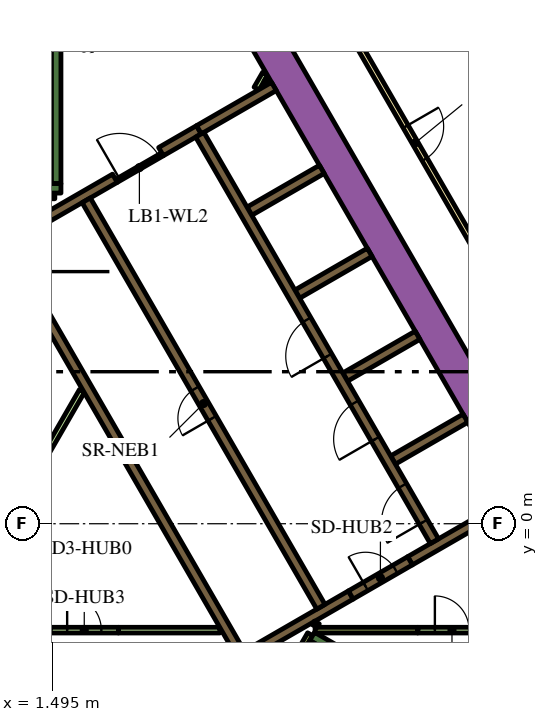
"""IFC4 building model, lengths in metres.
Left out: names, types, materials, properties, quantities, classifications, styles, units other than length and angle.
Written with IfcOpenShell. Run it as: python <this file> out.ifc"""

import sys

from ifc_helpers import new_model, si_unit, direction, frame, frame_2d, origin, place, context, subcontext, project, spatial, polyline, rectangle, outline, extrude, element, fill, save


model = new_model("IFC4")
c1 = context("Model", 3, precision=1e-05, world=origin(), true_north=direction((0.0, 1.0)))
c2 = subcontext(c1, "Body", "Model", "MODEL_VIEW")
j1 = project(units=[si_unit("LENGTHUNIT", "METRE"), si_unit("PLANEANGLEUNIT", "RADIAN")], contexts=[c1])
p1 = place(None, origin())
s1 = spatial("IfcSite", under=j1, at=p1, CompositionType="ELEMENT")
p2 = place(p1, origin())
s2 = spatial("IfcBuilding", under=s1, at=p2, CompositionType="ELEMENT")
p3 = place(p2, frame((0.0, 0.0, 130.5)))
s3 = spatial("IfcBuildingStorey", under=s2, at=p3, CompositionType="ELEMENT", Elevation=130.5)
p4 = place(p3, frame((6.776, 13.364, 0.0), z_axis=(0.0, 0.0, 1.0), x_axis=(0.500004177138, -0.8660229921, 0.0)))
e1 = element("IfcWall", 1, at=p4, inside=s3, PredefinedType="SOLIDWALL", context=c2, shape_type="SweptSolid", body=[
    extrude(rectangle(XDim=20.204, YDim=0.9, at=frame_2d((10.102, 0.0))), origin(), (0.0, 0.0, 1.0), 3.9),
])
p5 = place(p3, frame((8.334, -2.964, 0.0), z_axis=(0.0, 0.0, 1.0), x_axis=(0.866016039709, -0.500016218704, 0.0)))
e2 = element("IfcWall", 2, at=p5, inside=s3, PredefinedType="SOLIDWALL", context=c2, shape_type="SweptSolid", body=[
    extrude(rectangle(XDim=7.05, YDim=0.25, at=frame_2d((3.525, 0.0))), origin(), (0.0, 0.0, 1.0), 3.9),
])
p6 = place(p3, frame((8.163, -3.511, 0.0), z_axis=(0.0, 0.0, 1.0), x_axis=(0.500127794843, 0.865951608824, 0.0)))
e3 = element("IfcWall", 3, at=p6, inside=s3, PredefinedType="SOLIDWALL", context=c2, shape_type="SweptSolid", body=[
    extrude(rectangle(XDim=0.435, YDim=0.25, at=frame_2d((0.217, 0.0))), origin(), (0.0, 0.0, 1.0), 3.9),
])
p7 = place(p3, frame((1.6, 8.95, 0.0), z_axis=(0.0, 0.0, 1.0), x_axis=(0.0, 1.0, 0.0)))
e4 = element("IfcWall", 4, at=p7, inside=s3, PredefinedType="SOLIDWALL", context=c2, shape_type="SweptSolid", body=[
    extrude(rectangle(XDim=6.8, YDim=0.25, at=frame_2d((3.4, 0.0))), origin(), (0.0, 0.0, 1.0), 3.9),
])
p8 = place(p3, frame((1.05, 8.825, 0.0), z_axis=(0.0, 0.0, 1.0), x_axis=(1.0, 0.0, 0.0)))
e5 = element("IfcWall", 5, at=p8, inside=s3, PredefinedType="SOLIDWALL", context=c2, shape_type="SweptSolid", body=[
    extrude(rectangle(XDim=0.675, YDim=0.25, at=frame_2d((0.337, 0.0))), origin(), (0.0, 0.0, 1.0), 3.9),
])
p9 = place(p3, origin())
e6 = element("IfcWall", 6, at=p9, inside=s3, PredefinedType="SOLIDWALL", context=c2, shape_type="SweptSolid", body=[
    extrude(outline(polyline([(0.335, 6.925), (0.335, 7.075), (0.335, 7.075), (0.335, 7.075), (0.245, 7.075), (0.035, 7.439), (0.252, 7.564), (0.377, 7.348), (1.512, 5.382), (1.637, 5.165), (2.221, 4.153), (2.771, 3.199), (2.896, 2.983), (3.138, 2.564), (4.031, 1.017), (4.156, 0.801), (5.292, -1.165), (5.417, -1.382), (6.073, -2.519), (6.552, -3.348), (6.677, -3.564), (6.46, -3.689), (0.332, 6.925), (0.335, 6.925), (0.335, 6.925), (0.335, 6.925)])), origin(), (0.0, 0.0, 1.0), 3.9),
])
p10 = place(p3, frame((4.358, 9.791, 0.0), z_axis=(0.0, 0.0, 1.0), x_axis=(0.866079547155, 0.499906209203, 0.0)))
e7 = element("IfcWall", 7, at=p10, inside=s3, PredefinedType="SOLIDWALL", context=c2, shape_type="SweptSolid", body=[
    extrude(rectangle(XDim=1.15, YDim=0.25, at=frame_2d((0.575, 0.0))), origin(), (0.0, 0.0, 1.0), 3.9),
])
p11 = place(p3, frame((5.356, 10.367, 0.0), z_axis=(0.0, 0.0, 1.0), x_axis=(0.865978535641, 0.50008116922, 0.0)))
e8 = element("IfcWall", 8, at=p11, inside=s3, PredefinedType="SOLIDWALL", context=c2, shape_type="SweptSolid", body=[
    extrude(rectangle(XDim=2.278, YDim=0.25, at=frame_2d((1.139, 0.0))), origin(), (0.0, 0.0, 1.0), 3.9),
])
p12 = place(p3, frame((0.314, 7.456, 0.0), z_axis=(0.0, 0.0, 1.0), x_axis=(0.866013897511, 0.50001992892, 0.0)))
e9 = element("IfcWall", 9, at=p12, inside=s3, PredefinedType="SOLIDWALL", context=c2, shape_type="SweptSolid", body=[
    extrude(rectangle(XDim=3.268, YDim=0.25, at=frame_2d((1.634, 0.0))), origin(), (0.0, 0.0, 1.0), 3.9),
])
p13 = place(p3, frame((9.352, -1.875, 0.0), z_axis=(0.0, 0.0, 1.0), x_axis=(-0.866024844342, -0.500000968981, 0.0)))
e10 = element("IfcWall", 10, at=p13, inside=s3, PredefinedType="SOLIDWALL", context=c2, shape_type="SweptSolid", body=[
    extrude(rectangle(XDim=3.162, YDim=0.25, at=frame_2d((1.581, 0.0))), origin(), (0.0, 0.0, 1.0), 3.9),
])
for number, where, z_axis, x_axis in (
    (11, (6.684, 8.224, 0.0), (0.0, 0.0, 1.0), (0.866, 0.5, 0.0)),
    (12, (7.944, 6.041, 0.0), (0.0, 0.0, 1.0), (0.866, 0.5, 0.0)),
    (13, (9.204, 3.859, 0.0), (0.0, 0.0, 1.0), (0.866, 0.5, 0.0)),
):
    element("IfcWall", number, at=place(p3, frame(where, z_axis=z_axis, x_axis=x_axis)), inside=s3, PredefinedType="SOLIDWALL", context=c2, shape_type="SweptSolid", body=[
        extrude(rectangle(XDim=2.2, YDim=0.25, at=frame_2d((1.1, 0.0))), origin(), (0.0, 0.0, 1.0), 3.9),
    ])
p14 = place(p3, frame((10.911, -0.975, 0.0), z_axis=(0.0, 0.0, 1.0), x_axis=(0.866046979468, 0.499962627957, 0.0)))
e14 = element("IfcWall", 14, at=p14, inside=s3, PredefinedType="SOLIDWALL", context=c2, shape_type="SweptSolid", body=[
    extrude(rectangle(XDim=3.138, YDim=0.25, at=frame_2d((1.569, 0.0))), origin(), (0.0, 0.0, 1.0), 3.9),
])
p15 = place(p3, frame((10.464, 1.677, 0.0), z_axis=(0.0, 0.0, 1.0), x_axis=(0.86605622881, 0.499946605688, 0.0)))
e15 = element("IfcWall", 15, at=p15, inside=s3, PredefinedType="SOLIDWALL", context=c2, shape_type="SweptSolid", body=[
    extrude(rectangle(XDim=2.2, YDim=0.25, at=frame_2d((1.1, 0.0))), origin(), (0.0, 0.0, 1.0), 3.9),
])
p16 = place(p3, frame((8.412, -2.8, 0.0), z_axis=(0.0, 0.0, 1.0), x_axis=(1.0, 0.0, 0.0)))
e16 = element("IfcWall", 16, at=p16, inside=s3, PredefinedType="PARTITIONING", context=c2, shape_type="SweptSolid", body=[
    extrude(rectangle(XDim=2.702, YDim=0.15, at=frame_2d((1.351, 0.0))), origin(), (0.0, 0.0, 1.0), 3.9),
])
p17 = place(p3, frame((8.459, -2.599, 0.0), z_axis=(0.0, 0.0, 1.0), x_axis=(-0.501919277433, -0.864914469148, 0.0)))
e17 = element("IfcWall", 17, at=p17, inside=s3, PredefinedType="PARTITIONING", context=c2, shape_type="SweptSolid", body=[
    extrude(rectangle(XDim=0.109, YDim=0.15, at=frame_2d((0.054, 0.0))), origin(), (0.0, 0.0, 1.0), 3.9),
])
p18 = place(p3, frame((8.281, -2.907, 0.0), z_axis=(0.0, 0.0, 1.0), x_axis=(-0.500193841991, -0.86591346013, 0.0)))
e18 = element("IfcWall", 18, at=p18, inside=s3, PredefinedType="PARTITIONING", context=c2, shape_type="SweptSolid", body=[
    extrude(rectangle(XDim=0.583, YDim=0.15, at=frame_2d((0.292, 0.0))), origin(), (0.0, 0.0, 1.0), 3.9),
])
p19 = place(p3, frame((3.238, -2.8, 0.0), z_axis=(0.0, 0.0, 1.0), x_axis=(1.0, 0.0, 0.0)))
e19 = element("IfcWall", 19, at=p19, inside=s3, PredefinedType="PARTITIONING", context=c2, shape_type="SweptSolid", body=[
    extrude(rectangle(XDim=2.672, YDim=0.15, at=frame_2d((1.336, 0.0))), origin(), (0.0, 0.0, 1.0), 2.6),
])
p20 = place(p3, frame((1.016, 1.309, 0.0), z_axis=(0.0, 0.0, 1.0), x_axis=(0.49998231768, 0.866035612436, 0.0)))
e20 = element("IfcWall", 20, at=p20, inside=s3, PredefinedType="PARTITIONING", context=c2, shape_type="SweptSolid", body=[
    extrude(rectangle(XDim=2.521, YDim=0.15, at=frame_2d((1.26, 0.0))), origin(), (0.0, 0.0, 1.0), 2.6),
])
p21 = place(p3, frame((1.05, 8.625, 0.0), z_axis=(0.0, 0.0, 1.0), x_axis=(1.0, 0.0, 0.0)))
e21 = element("IfcWall", 21, at=p21, inside=s3, PredefinedType="PARTITIONING", context=c2, shape_type="SweptSolid", body=[
    extrude(rectangle(XDim=0.514, YDim=0.15, at=frame_2d((0.257, 0.0))), origin(), (0.0, 0.0, 1.0), 2.6),
])
p22 = place(p3, frame((6.872, 11.45, 0.0), z_axis=(0.0, 0.0, 1.0), x_axis=(0.499846793097, 0.866113839764, 0.0)))
e22 = element("IfcWall", 22, at=p22, inside=s3, PredefinedType="PARTITIONING", context=c2, shape_type="SweptSolid", body=[
    extrude(rectangle(XDim=0.453, YDim=0.15, at=frame_2d((0.227, 0.0))), origin(), (0.0, 0.0, 1.0), 2.6),
])
p23 = place(p3, frame((7.131, 11.6, 0.0), z_axis=(0.0, 0.0, 1.0), x_axis=(0.498600033135, 0.866832167699, 0.0)))
e23 = element("IfcWall", 23, at=p23, inside=s3, PredefinedType="PARTITIONING", context=c2, shape_type="SweptSolid", body=[
    extrude(rectangle(XDim=0.107, YDim=0.15, at=frame_2d((0.053, 0.0))), origin(), (0.0, 0.0, 1.0), 2.6),
])
p24 = place(p3, frame((11.553, -0.46, 0.0), z_axis=(0.0, 0.0, 1.0), x_axis=(-0.500006514828, 0.866021642414, 0.0)))
e24 = element("IfcWall", 24, at=p24, inside=s3, PredefinedType="SOLIDWALL", context=c2, shape_type="SweptSolid", body=[
    extrude(rectangle(XDim=12.35, YDim=0.25, at=frame_2d((6.175, 0.0))), origin(), (0.0, 0.0, 1.0), 3.9),
])
p25 = place(p24, frame((0.585, 0.0, 0.0)))
e25 = element("IfcOpeningElement", 25, at=p25, cuts=e24, PredefinedType="OPENING", context=c2, shape_type="SweptSolid", body=[
    extrude(rectangle(XDim=1.1, YDim=2.1, at=frame_2d((0.55, 1.05))), frame((0.0, 0.135, 0.0), z_axis=(0.0, -1.0, 0.0), x_axis=(1.0, 0.0, 0.0)), (0.0, 0.0, 1.0), 0.27),
])
p26 = place(p24, frame((3.105, 0.0, 0.0)))
e26 = element("IfcOpeningElement", 26, at=p26, cuts=e24, PredefinedType="OPENING", context=c2, shape_type="SweptSolid", body=[
    extrude(rectangle(XDim=1.1, YDim=2.1, at=frame_2d((0.55, 1.05))), frame((0.0, 0.135, 0.0), z_axis=(0.0, -1.0, 0.0), x_axis=(1.0, 0.0, 0.0)), (0.0, 0.0, 1.0), 0.27),
])
p27 = place(p24, frame((5.625, 0.0, 0.0)))
e27 = element("IfcOpeningElement", 27, at=p27, cuts=e24, PredefinedType="OPENING", context=c2, shape_type="SweptSolid", body=[
    extrude(rectangle(XDim=1.1, YDim=2.1, at=frame_2d((0.55, 1.05))), frame((0.0, 0.135, 0.0), z_axis=(0.0, -1.0, 0.0), x_axis=(1.0, 0.0, 0.0)), (0.0, 0.0, 1.0), 0.27),
])
p28 = place(p3, frame((8.565, -2.185, 0.0), z_axis=(0.0, 0.0, 1.0), x_axis=(-0.499997954832, 0.866026584559, 0.0)))
e28 = element("IfcWall", 28, at=p28, inside=s3, PredefinedType="SOLIDWALL", context=c2, shape_type="SweptSolid", body=[
    extrude(rectangle(XDim=12.35, YDim=0.25, at=frame_2d((6.175, 0.0))), origin(), (0.0, 0.0, 1.0), 3.9),
])
p29 = place(p28, frame((5.725, 0.0, 0.0)))
e29 = element("IfcOpeningElement", 29, at=p29, cuts=e28, PredefinedType="OPENING", context=c2, shape_type="SweptSolid", body=[
    extrude(rectangle(XDim=0.9, YDim=2.1, at=frame_2d((0.45, 1.05))), frame((0.0, 0.135, 0.0), z_axis=(0.0, -1.0, 0.0), x_axis=(1.0, 0.0, 0.0)), (0.0, 0.0, 1.0), 0.27),
])
p30 = place(p3, frame((3.183, 9.02, 0.0), z_axis=(0.0, 0.0, 1.0), x_axis=(0.866034573852, 0.49998411664, 0.0)))
e30 = element("IfcWall", 30, at=p30, inside=s3, PredefinedType="PARTITIONING", context=c2, shape_type="SweptSolid", body=[
    extrude(rectangle(XDim=1.4, YDim=0.09, at=frame_2d((0.7, 0.0))), origin(), (0.0, 0.0, 1.0), 2.6),
])
p31 = place(p30, frame((0.1, 0.0, 0.0)))
e31 = element("IfcOpeningElement", 31, at=p31, cuts=e30, PredefinedType="OPENING", context=c2, shape_type="SweptSolid", body=[
    extrude(rectangle(XDim=1.2, YDim=2.1, at=frame_2d((0.6, 1.05))), frame((0.0, 0.055, 0.0), z_axis=(0.0, -1.0, 0.0), x_axis=(1.0, 0.0, 0.0)), (0.0, 0.0, 1.0), 0.11),
])
p32 = place(p3, frame((9.352, -1.875, 0.0), z_axis=(0.0, 0.0, 1.0), x_axis=(0.865989075817, 0.500062916607, 0.0)))
e32 = element("IfcWall", 32, at=p32, inside=s3, PredefinedType="SOLIDWALL", context=c2, shape_type="SweptSolid", body=[
    extrude(rectangle(XDim=1.8, YDim=0.25, at=frame_2d((0.9, 0.0))), origin(), (0.0, 0.0, 1.0), 3.9),
])
p33 = place(p32, frame((0.45, 0.0, 0.0)))
e33 = element("IfcOpeningElement", 33, at=p33, cuts=e32, PredefinedType="OPENING", context=c2, shape_type="SweptSolid", body=[
    extrude(rectangle(XDim=0.9, YDim=2.1, at=frame_2d((0.45, 1.05))), frame((0.0, 0.135, 0.0), z_axis=(0.0, -1.0, 0.0), x_axis=(1.0, 0.0, 0.0)), (0.0, 0.0, 1.0), 0.27),
])
p34 = place(p3, frame((1.438, -2.8, 0.0), z_axis=(0.0, 0.0, 1.0), x_axis=(1.0, 0.0, 0.0)))
e34 = element("IfcWall", 34, at=p34, inside=s3, PredefinedType="PARTITIONING", context=c2, shape_type="SweptSolid", body=[
    extrude(rectangle(XDim=1.8, YDim=0.15, at=frame_2d((0.9, 0.0))), origin(), (0.0, 0.0, 1.0), 2.6),
])
p35 = place(p34, frame((0.45, 0.0, 0.0)))
e35 = element("IfcOpeningElement", 35, at=p35, cuts=e34, PredefinedType="OPENING", context=c2, shape_type="SweptSolid", body=[
    extrude(rectangle(XDim=0.9, YDim=2.1, at=frame_2d((0.45, 1.05))), frame((0.0, 0.085, 0.0), z_axis=(0.0, -1.0, 0.0), x_axis=(1.0, 0.0, 0.0)), (0.0, 0.0, 1.0), 0.17),
])
p36 = place(p3, frame((11.115, -2.8, 0.0), z_axis=(0.0, 0.0, 1.0), x_axis=(1.0, 0.0, 0.0)))
e36 = element("IfcWall", 36, at=p36, inside=s3, PredefinedType="PARTITIONING", context=c2, shape_type="SweptSolid", body=[
    extrude(rectangle(XDim=1.8, YDim=0.15, at=frame_2d((0.9, 0.0))), origin(), (0.0, 0.0, 1.0), 2.6),
])
p37 = place(p36, frame((0.45, 0.0, 0.0)))
e37 = element("IfcOpeningElement", 37, at=p37, cuts=e36, PredefinedType="OPENING", context=c2, shape_type="SweptSolid", body=[
    extrude(rectangle(XDim=0.9, YDim=2.1, at=frame_2d((0.45, 1.05))), frame((0.0, 0.085, 0.0), z_axis=(0.0, -1.0, 0.0), x_axis=(1.0, 0.0, 0.0)), (0.0, 0.0, 1.0), 0.17),
])
p38 = place(p3, frame((6.163, 18.475, 0.0), z_axis=(0.0, 0.0, 1.0), x_axis=(0.500001317485, -0.866024643133, 0.0)))
e38 = element("IfcWall", 38, at=p38, inside=s3, PredefinedType="PARTITIONING", context=c2, shape_type="SweptSolid", body=[
    extrude(rectangle(XDim=25.767, YDim=0.15, at=frame_2d((12.883, 0.0))), origin(), (0.0, 0.0, 1.0), 2.6),
])
p39 = place(p38, frame((21.774, 0.0, 0.0)))
e39 = element("IfcOpeningElement", 39, at=p39, cuts=e38, PredefinedType="OPENING", context=c2, shape_type="SweptSolid", body=[
    extrude(rectangle(XDim=1.0, YDim=2.1, at=frame_2d((0.5, 1.05))), frame((0.0, 0.085, 0.0), z_axis=(0.0, -1.0, 0.0), x_axis=(1.0, 0.0, 0.0)), (0.0, 0.0, 1.0), 0.17),
])
p40 = place(p38, frame((15.571, 0.0, 0.0)))
e40 = element("IfcOpeningElement", 40, at=p40, cuts=e38, PredefinedType="OPENING", context=c2, shape_type="SweptSolid", body=[
    extrude(rectangle(XDim=1.0, YDim=2.1, at=frame_2d((0.5, 1.05))), frame((0.0, 0.085, 0.0), z_axis=(0.0, -1.0, 0.0), x_axis=(1.0, 0.0, 0.0)), (0.0, 0.0, 1.0), 0.17),
])
p41 = place(p38, frame((9.265, 0.0, 0.0)))
e41 = element("IfcOpeningElement", 41, at=p41, cuts=e38, PredefinedType="OPENING", context=c2, shape_type="SweptSolid", body=[
    extrude(rectangle(XDim=1.0, YDim=2.1, at=frame_2d((0.5, 1.05))), frame((0.0, 0.085, 0.0), z_axis=(0.0, -1.0, 0.0), x_axis=(1.0, 0.0, 0.0)), (0.0, 0.0, 1.0), 0.17),
])
p42 = place(p38, frame((3.063, 0.0, 0.0)))
e42 = element("IfcOpeningElement", 42, at=p42, cuts=e38, PredefinedType="OPENING", context=c2, shape_type="SweptSolid", body=[
    extrude(rectangle(XDim=1.0, YDim=2.1, at=frame_2d((0.5, 1.05))), frame((0.0, 0.085, 0.0), z_axis=(0.0, -1.0, 0.0), x_axis=(1.0, 0.0, 0.0)), (0.0, 0.0, 1.0), 0.17),
])
p43 = place(p25, origin())
e43 = element("IfcDoor", 43, at=p43, inside=s3, OperationType="DOUBLE_DOOR_SLIDING", PredefinedType="DOOR", context=c2, shape_type="SweptSolid", body=[
    extrude(rectangle(XDim=1.1, YDim=2.1, at=frame_2d((0.55, 1.05))), frame((0.0, 0.025, 0.0), z_axis=(0.0, -1.0, 0.0), x_axis=(1.0, 0.0, 0.0)), (0.0, 0.0, 1.0), 0.05),
])
fill(e25, e43)
p44 = place(p26, origin())
e44 = element("IfcDoor", 44, at=p44, inside=s3, OperationType="DOUBLE_DOOR_SLIDING", PredefinedType="DOOR", context=c2, shape_type="SweptSolid", body=[
    extrude(rectangle(XDim=1.1, YDim=2.1, at=frame_2d((0.55, 1.05))), frame((0.0, 0.025, 0.0), z_axis=(0.0, -1.0, 0.0), x_axis=(1.0, 0.0, 0.0)), (0.0, 0.0, 1.0), 0.05),
])
fill(e26, e44)
p45 = place(p27, origin())
e45 = element("IfcDoor", 45, at=p45, inside=s3, OperationType="DOUBLE_DOOR_SLIDING", PredefinedType="DOOR", context=c2, shape_type="SweptSolid", body=[
    extrude(rectangle(XDim=1.1, YDim=2.1, at=frame_2d((0.55, 1.05))), frame((0.0, 0.025, 0.0), z_axis=(0.0, -1.0, 0.0), x_axis=(1.0, 0.0, 0.0)), (0.0, 0.0, 1.0), 0.05),
])
fill(e27, e45)
p46 = place(p29, origin())
e46 = element("IfcDoor", 46, at=p46, inside=s3, OperationType="SINGLE_SWING_LEFT", PredefinedType="DOOR", context=c2, shape_type="SweptSolid", body=[
    extrude(rectangle(XDim=0.9, YDim=2.1, at=frame_2d((0.45, 1.05))), frame((0.0, 0.025, 0.0), z_axis=(0.0, -1.0, 0.0), x_axis=(1.0, 0.0, 0.0)), (0.0, 0.0, 1.0), 0.05),
])
fill(e29, e46)
p47 = place(p31, origin())
e47 = element("IfcDoor", 47, at=p47, inside=s3, OperationType="SINGLE_SWING_LEFT", PredefinedType="DOOR", context=c2, shape_type="SweptSolid", body=[
    extrude(rectangle(XDim=1.2, YDim=2.1, at=frame_2d((0.6, 1.05))), frame((0.0, 0.025, 0.0), z_axis=(0.0, -1.0, 0.0), x_axis=(1.0, 0.0, 0.0)), (0.0, 0.0, 1.0), 0.05),
])
fill(e31, e47)
p48 = place(p33, origin())
e48 = element("IfcDoor", 48, at=p48, inside=s3, OperationType="SINGLE_SWING_LEFT", PredefinedType="DOOR", context=c2, shape_type="SweptSolid", body=[
    extrude(rectangle(XDim=0.9, YDim=2.1, at=frame_2d((0.45, 1.05))), frame((0.0, 0.025, 0.0), z_axis=(0.0, -1.0, 0.0), x_axis=(1.0, 0.0, 0.0)), (0.0, 0.0, 1.0), 0.05),
])
fill(e33, e48)
p49 = place(p35, origin())
e49 = element("IfcDoor", 49, at=p49, inside=s3, OperationType="SINGLE_SWING_LEFT", PredefinedType="DOOR", context=c2, shape_type="SweptSolid", body=[
    extrude(rectangle(XDim=0.9, YDim=2.1, at=frame_2d((0.45, 1.05))), frame((0.0, 0.025, 0.0), z_axis=(0.0, -1.0, 0.0), x_axis=(1.0, 0.0, 0.0)), (0.0, 0.0, 1.0), 0.05),
])
fill(e35, e49)
p50 = place(p37, origin())
e50 = element("IfcDoor", 50, at=p50, inside=s3, OperationType="SINGLE_SWING_LEFT", PredefinedType="DOOR", context=c2, shape_type="SweptSolid", body=[
    extrude(rectangle(XDim=0.9, YDim=2.1, at=frame_2d((0.45, 1.05))), frame((0.0, 0.025, 0.0), z_axis=(0.0, -1.0, 0.0), x_axis=(1.0, 0.0, 0.0)), (0.0, 0.0, 1.0), 0.05),
])
fill(e37, e50)
p51 = place(p41, origin())
e51 = element("IfcDoor", 51, at=p51, inside=s3, OperationType="SINGLE_SWING_RIGHT", PredefinedType="DOOR", context=c2, shape_type="SweptSolid", body=[
    extrude(rectangle(XDim=1.0, YDim=2.1, at=frame_2d((0.5, 1.05))), frame((0.0, 0.025, 0.0), z_axis=(0.0, -1.0, 0.0), x_axis=(1.0, 0.0, 0.0)), (0.0, 0.0, 1.0), 0.05),
])
fill(e41, e51)
save(model, sys.argv[1])
